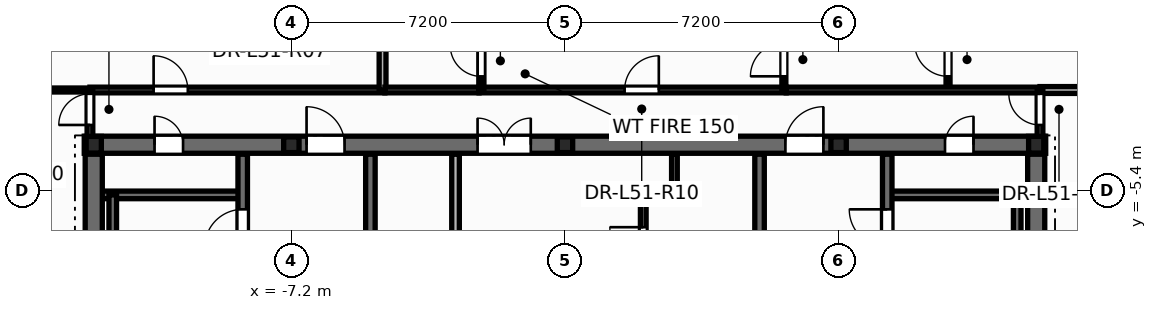
"""IFC4 building model, lengths in metres.
Left out: names, types, materials, properties, quantities, classifications, styles, units other than length and angle.
Written with IfcOpenShell. Run it as: python <this file> out.ifc"""

import sys

from ifc_helpers import new_model, si_unit, direction, frame, frame_2d, origin, origin_2d, place, context, subcontext, project, spatial, rectangle, i_section, extrude, element, fill, save


model = new_model("IFC4")
c1 = context("Model", 3, precision=1e-05, world=origin(), true_north=direction((0.0, 1.0)))
c2 = subcontext(c1, "Body", "Model", "MODEL_VIEW")
j1 = project(units=[si_unit("LENGTHUNIT", "METRE"), si_unit("PLANEANGLEUNIT", "RADIAN")], contexts=[c1])
p1 = place(None, origin())
s1 = spatial("IfcSite", under=j1, at=p1, CompositionType="ELEMENT")
p2 = place(p1, origin())
s2 = spatial("IfcBuilding", under=s1, at=p2, CompositionType="ELEMENT")
p3 = place(p2, frame((0.0, 0.0, 196.5)))
s3 = spatial("IfcBuildingStorey", under=s2, at=p3, CompositionType="ELEMENT", Elevation=196.5)
for number, where, z_axis, x_axis in (
    (1, (12.4, -4.2, 0.0), (0.0, 0.0, 1.0), (1.0, 0.0, 0.0)),
    (2, (-12.4, -4.2, 0.0), (0.0, 0.0, 1.0), (1.0, 0.0, 0.0)),
):
    element("IfcColumn", number, at=place(p3, frame(where, z_axis=z_axis, x_axis=x_axis)), inside=s3, PredefinedType="COLUMN", context=c2, shape_type="SweptSolid", body=[
        extrude(i_section(OverallWidth=0.4, OverallDepth=0.44, WebThickness=0.028, FlangeThickness=0.04, at=origin_2d()), origin(), (0.0, 0.0, 1.0), 3.6),
    ])
for number, where, z_axis, x_axis in (
    (3, (-7.2, -4.2, 0.0), (0.0, 0.0, 1.0), (1.0, 0.0, 0.0)),
    (4, (0.0, -4.2, 0.0), (0.0, 0.0, 1.0), (1.0, 0.0, 0.0)),
    (5, (7.2, -4.2, 0.0), (0.0, 0.0, 1.0), (1.0, 0.0, 0.0)),
):
    element("IfcColumn", number, at=place(p3, frame(where, z_axis=z_axis, x_axis=x_axis)), inside=s3, PredefinedType="PILASTER", context=c2, shape_type="SweptSolid", body=[
        extrude(i_section(OverallWidth=0.405, OverallDepth=0.414, WebThickness=0.022, FlangeThickness=0.032, at=origin_2d()), origin(), (0.0, 0.0, 1.0), 3.6),
    ])
p4 = place(p3, frame((2.06, -7.9, 0.0), z_axis=(0.0, 0.0, 1.0), x_axis=(0.0, 1.0, 0.0)))
e6 = element("IfcWall", 6, at=p4, inside=s3, PredefinedType="PARTITIONING", context=c2, shape_type="SweptSolid", body=[
    extrude(rectangle(XDim=2.3, YDim=0.15, at=frame_2d((1.15, 0.0))), origin(), (0.0, 0.0, 1.0), 3.35),
])
p5 = place(p4, frame((0.65, 0.0, 0.0)))
e7 = element("IfcOpeningElement", 7, at=p5, cuts=e6, PredefinedType="OPENING", context=c2, shape_type="SweptSolid", body=[
    extrude(rectangle(XDim=0.886, YDim=2.104, at=frame_2d((0.44, 1.052))), frame((0.0, 0.085, 0.0), z_axis=(0.0, -1.0, 0.0), x_axis=(1.0, 0.0, 0.0)), (0.0, 0.0, 1.0), 0.17),
])
p6 = place(p3, frame((2.06, -5.6, 0.0), z_axis=(0.0, 0.0, 1.0), x_axis=(1.0, 0.0, 0.0)))
e8 = element("IfcWall", 8, at=p6, inside=s3, PredefinedType="PARTITIONING", context=c2, shape_type="SweptSolid", body=[
    extrude(rectangle(XDim=0.82, YDim=0.15, at=frame_2d((0.41, 0.0))), origin(), (0.0, 0.0, 1.0), 3.35),
])
p7 = place(p3, frame((2.88, -5.6, 0.0), z_axis=(0.0, 0.0, 1.0), x_axis=(0.0, 1.0, 0.0)))
e9 = element("IfcWall", 9, at=p7, inside=s3, PredefinedType="PARTITIONING", context=c2, shape_type="SweptSolid", body=[
    extrude(rectangle(XDim=1.15, YDim=0.15, at=frame_2d((0.575, 0.0))), origin(), (0.0, 0.0, 1.0), 3.35),
])
p8 = place(p3, frame((-12.65, -4.2, 0.0), z_axis=(0.0, 0.0, 1.0), x_axis=(1.0, 0.0, 0.0)))
e10 = element("IfcWall", 10, at=p8, inside=s3, PredefinedType="SHEAR", context=c2, shape_type="SweptSolid", body=[
    extrude(rectangle(XDim=25.3, YDim=0.45, at=frame_2d((12.65, 0.0))), origin(), (0.0, 0.0, 1.0), 3.6),
])
p9 = place(p8, frame((1.85, 0.0, 0.0)))
e11 = element("IfcOpeningElement", 11, at=p9, cuts=e10, PredefinedType="OPENING", context=c2, shape_type="SweptSolid", body=[
    extrude(rectangle(XDim=0.756, YDim=2.054, at=frame_2d((0.375, 1.027))), frame((0.0, 0.235, 0.0), z_axis=(0.0, -1.0, 0.0), x_axis=(1.0, 0.0, 0.0)), (0.0, 0.0, 1.0), 0.47),
])
p10 = place(p8, frame((22.65, 0.0, 0.0)))
e12 = element("IfcOpeningElement", 12, at=p10, cuts=e10, PredefinedType="OPENING", context=c2, shape_type="SweptSolid", body=[
    extrude(rectangle(XDim=0.756, YDim=2.054, at=frame_2d((0.375, 1.027))), frame((0.0, 0.235, 0.0), z_axis=(0.0, -1.0, 0.0), x_axis=(1.0, 0.0, 0.0)), (0.0, 0.0, 1.0), 0.47),
])
p11 = place(p8, frame((5.85, 0.0, 0.0)))
e13 = element("IfcOpeningElement", 13, at=p11, cuts=e10, PredefinedType="OPENING", context=c2, shape_type="SweptSolid", body=[
    extrude(rectangle(XDim=1.006, YDim=2.104, at=frame_2d((0.5, 1.052))), frame((0.0, 0.235, 0.0), z_axis=(0.0, -1.0, 0.0), x_axis=(1.0, 0.0, 0.0)), (0.0, 0.0, 1.0), 0.47),
])
p12 = place(p8, frame((10.35, 0.0, 0.0)))
e14 = element("IfcOpeningElement", 14, at=p12, cuts=e10, PredefinedType="OPENING", context=c2, shape_type="SweptSolid", body=[
    extrude(rectangle(XDim=1.406, YDim=2.154, at=frame_2d((0.7, 1.077))), frame((0.0, 0.235, 0.0), z_axis=(0.0, -1.0, 0.0), x_axis=(1.0, 0.0, 0.0)), (0.0, 0.0, 1.0), 0.47),
])
p13 = place(p8, frame((18.45, 0.0, 0.0)))
e15 = element("IfcOpeningElement", 15, at=p13, cuts=e10, PredefinedType="OPENING", context=c2, shape_type="SweptSolid", body=[
    extrude(rectangle(XDim=1.006, YDim=2.104, at=frame_2d((0.5, 1.052))), frame((0.0, 0.235, 0.0), z_axis=(0.0, -1.0, 0.0), x_axis=(1.0, 0.0, 0.0)), (0.0, 0.0, 1.0), 0.47),
])
p14 = place(p3, frame((-12.35, -5.52, 0.0), z_axis=(0.0, 0.0, 1.0), x_axis=(1.0, 0.0, 0.0)))
e16 = element("IfcWall", 16, at=p14, inside=s3, PredefinedType="SOLIDWALL", context=c2, shape_type="SweptSolid", body=[
    extrude(rectangle(XDim=3.87, YDim=0.2, at=frame_2d((1.935, 0.0))), origin(), (0.0, 0.0, 1.0), 3.6),
])
p15 = place(p3, frame((-11.9, -13.1, 0.0), z_axis=(0.0, 0.0, 1.0), x_axis=(0.0, 1.0, 0.0)))
e17 = element("IfcWall", 17, at=p15, inside=s3, PredefinedType="SOLIDWALL", context=c2, shape_type="SweptSolid", body=[
    extrude(rectangle(XDim=7.58, YDim=0.2, at=frame_2d((3.79, 0.0))), origin(), (0.0, 0.0, 1.0), 3.6),
])
p16 = place(p3, frame((8.48, -5.52, 0.0), z_axis=(0.0, 0.0, 1.0), x_axis=(1.0, 0.0, 0.0)))
e18 = element("IfcWall", 18, at=p16, inside=s3, PredefinedType="SOLIDWALL", context=c2, shape_type="SweptSolid", body=[
    extrude(rectangle(XDim=3.87, YDim=0.2, at=frame_2d((1.935, 0.0))), origin(), (0.0, 0.0, 1.0), 3.6),
])
p17 = place(p3, frame((11.9, -13.1, 0.0), z_axis=(0.0, 0.0, 1.0), x_axis=(0.0, 1.0, 0.0)))
e19 = element("IfcWall", 19, at=p17, inside=s3, PredefinedType="SOLIDWALL", context=c2, shape_type="SweptSolid", body=[
    extrude(rectangle(XDim=7.58, YDim=0.2, at=frame_2d((3.79, 0.0))), origin(), (0.0, 0.0, 1.0), 3.6),
])
p18 = place(p3, frame((-8.48, -13.85, 0.0), z_axis=(0.0, 0.0, 1.0), x_axis=(0.0, 1.0, 0.0)))
e20 = element("IfcWall", 20, at=p18, inside=s3, PredefinedType="SHEAR", context=c2, shape_type="SweptSolid", body=[
    extrude(rectangle(XDim=9.4, YDim=0.25, at=frame_2d((4.7, 0.0))), origin(), (0.0, 0.0, 1.0), 3.6),
])
p19 = place(p18, frame((6.95, 0.0, 0.0)))
e21 = element("IfcOpeningElement", 21, at=p19, cuts=e20, PredefinedType="OPENING", context=c2, shape_type="SweptSolid", body=[
    extrude(rectangle(XDim=1.006, YDim=2.104, at=frame_2d((0.5, 1.052))), frame((0.0, 0.135, 0.0), z_axis=(0.0, -1.0, 0.0), x_axis=(1.0, 0.0, 0.0)), (0.0, 0.0, 1.0), 0.27),
])
p20 = place(p3, frame((8.48, -13.85, 0.0), z_axis=(0.0, 0.0, 1.0), x_axis=(0.0, 1.0, 0.0)))
e22 = element("IfcWall", 22, at=p20, inside=s3, PredefinedType="SHEAR", context=c2, shape_type="SweptSolid", body=[
    extrude(rectangle(XDim=9.4, YDim=0.25, at=frame_2d((4.7, 0.0))), origin(), (0.0, 0.0, 1.0), 3.6),
])
p21 = place(p20, frame((6.95, 0.0, 0.0)))
e23 = element("IfcOpeningElement", 23, at=p21, cuts=e22, PredefinedType="OPENING", context=c2, shape_type="SweptSolid", body=[
    extrude(rectangle(XDim=1.006, YDim=2.104, at=frame_2d((0.5, 1.052))), frame((0.0, 0.135, 0.0), z_axis=(0.0, -1.0, 0.0), x_axis=(1.0, 0.0, 0.0)), (0.0, 0.0, 1.0), 0.27),
])
for number, where, z_axis, x_axis in (
    (24, (-5.12, -13.85, 0.0), (0.0, 0.0, 1.0), (0.0, 1.0, 0.0)),
    (25, (5.12, -13.85, 0.0), (0.0, 0.0, 1.0), (0.0, 1.0, 0.0)),
):
    element("IfcWall", number, at=place(p3, frame(where, z_axis=z_axis, x_axis=x_axis)), inside=s3, PredefinedType="SHEAR", context=c2, shape_type="SweptSolid", body=[
        extrude(rectangle(XDim=9.4, YDim=0.25, at=frame_2d((4.7, 0.0))), origin(), (0.0, 0.0, 1.0), 3.6),
    ])
for number, where, z_axis, x_axis in (
    (26, (-12.4, -13.85, 0.0), (0.0, 0.0, 1.0), (0.0, 1.0, 0.0)),
    (27, (12.4, -13.85, 0.0), (0.0, 0.0, 1.0), (0.0, 1.0, 0.0)),
):
    element("IfcWall", number, at=place(p3, frame(where, z_axis=z_axis, x_axis=x_axis)), inside=s3, PredefinedType="SHEAR", context=c2, shape_type="SweptSolid", body=[
        extrude(rectangle(XDim=9.4, YDim=0.45, at=frame_2d((4.7, 0.0))), origin(), (0.0, 0.0, 1.0), 3.6),
    ])
p22 = place(p3, frame((-2.88, -9.45, 0.0), z_axis=(0.0, 0.0, 1.0), x_axis=(0.0, 1.0, 0.0)))
e28 = element("IfcWall", 28, at=p22, inside=s3, PredefinedType="SOLIDWALL", context=c2, shape_type="SweptSolid", body=[
    extrude(rectangle(XDim=5.0, YDim=0.2, at=frame_2d((2.5, 0.0))), origin(), (0.0, 0.0, 1.0), 3.35),
])
p23 = place(p22, frame((2.05, 0.0, 0.0)))
e29 = element("IfcOpeningElement", 29, at=p23, cuts=e28, PredefinedType="OPENING", context=c2, shape_type="SweptSolid", body=[
    extrude(rectangle(XDim=0.926, YDim=2.104, at=frame_2d((0.46, 1.052))), frame((0.0, 0.11, 0.0), z_axis=(0.0, -1.0, 0.0), x_axis=(1.0, 0.0, 0.0)), (0.0, 0.0, 1.0), 0.22),
])
p24 = place(p3, frame((-2.26, -2.76, 0.0), z_axis=(0.0, 0.0, 1.0), x_axis=(1.0, 0.0, 0.0)))
e30 = element("IfcWall", 30, at=p24, inside=s3, PredefinedType="PARTITIONING", context=c2, shape_type="SweptSolid", body=[
    extrude(rectangle(XDim=8.08, YDim=0.15, at=frame_2d((4.04, 0.0))), origin(), (0.0, 0.0, 1.0), 2.325),
])
p25 = place(p24, frame((3.829, 0.0, 0.0)))
e31 = element("IfcOpeningElement", 31, at=p25, cuts=e30, PredefinedType="OPENING", context=c2, shape_type="SweptSolid", body=[
    extrude(rectangle(XDim=0.906, YDim=2.104, at=frame_2d((0.45, 1.052))), frame((0.0, 0.085, 0.0), z_axis=(0.0, -1.0, 0.0), x_axis=(1.0, 0.0, 0.0)), (0.0, 0.0, 1.0), 0.17),
])
p26 = place(p3, frame((-12.5, -2.76, 0.0), z_axis=(0.0, 0.0, 1.0), x_axis=(1.0, 0.0, 0.0)))
e32 = element("IfcWall", 32, at=p26, inside=s3, PredefinedType="PARTITIONING", context=c2, shape_type="SweptSolid", body=[
    extrude(rectangle(XDim=7.76, YDim=0.15, at=frame_2d((3.88, 0.0))), origin(), (0.0, 0.0, 1.0), 2.325),
])
p27 = place(p26, frame((1.675, 0.0, 0.0)))
e33 = element("IfcOpeningElement", 33, at=p27, cuts=e32, PredefinedType="OPENING", context=c2, shape_type="SweptSolid", body=[
    extrude(rectangle(XDim=0.906, YDim=2.104, at=frame_2d((0.45, 1.052))), frame((0.0, 0.085, 0.0), z_axis=(0.0, -1.0, 0.0), x_axis=(1.0, 0.0, 0.0)), (0.0, 0.0, 1.0), 0.17),
])
p28 = place(p3, frame((10.08, -2.76, 0.0), z_axis=(0.0, 0.0, 1.0), x_axis=(0.0, 1.0, 0.0)))
e34 = element("IfcWall", 34, at=p28, inside=s3, PredefinedType="PARTITIONING", context=c2, shape_type="SweptSolid", body=[
    extrude(rectangle(XDim=6.971, YDim=0.105, at=frame_2d((3.485, 0.0))), origin(), (0.0, 0.0, 1.0), 2.625),
])
p29 = place(p28, frame((0.36, 0.0, 0.0)))
e35 = element("IfcOpeningElement", 35, at=p29, cuts=e34, PredefinedType="OPENING", context=c2, shape_type="SweptSolid", body=[
    extrude(rectangle(XDim=0.886, YDim=2.104, at=frame_2d((0.44, 1.052))), frame((0.0, 0.062, 0.0), z_axis=(0.0, -1.0, 0.0), x_axis=(1.0, 0.0, 0.0)), (0.0, 0.0, 1.0), 0.125),
])
p30 = place(p3, frame((5.76, -2.76, 0.0), z_axis=(0.0, 0.0, 1.0), x_axis=(0.0, 1.0, 0.0)))
e36 = element("IfcWall", 36, at=p30, inside=s3, PredefinedType="PARTITIONING", context=c2, shape_type="SweptSolid", body=[
    extrude(rectangle(XDim=6.52, YDim=0.105, at=frame_2d((3.26, 0.0))), origin(), (0.0, 0.0, 1.0), 2.325),
])
p31 = place(p30, frame((0.36, 0.0, 0.0)))
e37 = element("IfcOpeningElement", 37, at=p31, cuts=e36, PredefinedType="OPENING", context=c2, shape_type="SweptSolid", body=[
    extrude(rectangle(XDim=0.886, YDim=2.104, at=frame_2d((0.44, 1.052))), frame((0.0, 0.062, 0.0), z_axis=(0.0, -1.0, 0.0), x_axis=(1.0, 0.0, 0.0)), (0.0, 0.0, 1.0), 0.125),
])
p32 = place(p3, frame((-4.8, -2.76, 0.0), z_axis=(0.0, 0.0, 1.0), x_axis=(0.0, 1.0, 0.0)))
e38 = element("IfcWall", 38, at=p32, inside=s3, PredefinedType="PARTITIONING", context=c2, shape_type="SweptSolid", body=[
    extrude(rectangle(XDim=14.31, YDim=0.18, at=frame_2d((7.155, 0.0))), origin(), (0.0, 0.0, 1.0), 2.325),
])
p33 = place(p3, frame((5.822, -2.76, 0.0), z_axis=(0.0, 0.0, 1.0), x_axis=(1.0, 0.0, 0.0)))
e39 = element("IfcWall", 39, at=p33, inside=s3, PredefinedType="PARTITIONING", context=c2, shape_type="SweptSolid", body=[
    extrude(rectangle(XDim=6.678, YDim=0.15, at=frame_2d((3.339, 0.0))), origin(), (0.0, 0.0, 1.0), 2.325),
])
p34 = place(p3, frame((-2.2, -2.76, 0.0), z_axis=(0.0, 0.0, 1.0), x_axis=(0.0, 1.0, 0.0)))
e40 = element("IfcWall", 40, at=p34, inside=s3, PredefinedType="PARTITIONING", context=c2, shape_type="SweptSolid", body=[
    extrude(rectangle(XDim=2.92, YDim=0.135, at=frame_2d((1.46, 0.0))), origin(), (0.0, 0.0, 1.0), 3.35),
])
p35 = place(p34, frame((0.357, 0.0, 0.0)))
e41 = element("IfcOpeningElement", 41, at=p35, cuts=e40, PredefinedType="OPENING", context=c2, shape_type="SweptSolid", body=[
    extrude(rectangle(XDim=0.826, YDim=2.104, at=frame_2d((0.41, 1.052))), frame((0.0, 0.078, 0.0), z_axis=(0.0, -1.0, 0.0), x_axis=(1.0, 0.0, 0.0)), (0.0, 0.0, 1.0), 0.155),
])
p36 = place(p3, frame((-4.738, -2.76, 0.0), z_axis=(0.0, 0.0, 1.0), x_axis=(1.0, 0.0, 0.0)))
e42 = element("IfcWall", 42, at=p36, inside=s3, PredefinedType="PARTITIONING", context=c2, shape_type="SweptSolid", body=[
    extrude(rectangle(XDim=2.476, YDim=0.15, at=frame_2d((1.238, 0.0))), origin(), (0.0, 0.0, 1.0), 2.969),
])
p37 = place(p3, frame((-15.095, -2.76, 0.0), z_axis=(0.0, 0.0, 1.0), x_axis=(1.0, 0.0, 0.0)))
e43 = element("IfcWall", 43, at=p37, inside=s3, PredefinedType="PARTITIONING", context=c2, shape_type="SweptSolid", body=[
    extrude(rectangle(XDim=2.595, YDim=0.105, at=frame_2d((1.297, 0.0))), origin(), (0.0, 0.0, 1.0), 2.625),
])
p38 = place(p3, frame((12.5, -2.76, 0.0), z_axis=(0.0, 0.0, 1.0), x_axis=(1.0, 0.0, 0.0)))
e44 = element("IfcWall", 44, at=p38, inside=s3, PredefinedType="PARTITIONING", context=c2, shape_type="SweptSolid", body=[
    extrude(rectangle(XDim=2.595, YDim=0.18, at=frame_2d((1.297, 0.0))), origin(), (0.0, 0.0, 1.0), 2.625),
])
p39 = place(p3, frame((-12.5, -4.24, 0.0), z_axis=(0.0, 0.0, 1.0), x_axis=(0.0, 1.0, 0.0)))
e45 = element("IfcWall", 45, at=p39, inside=s3, PredefinedType="PARTITIONING", context=c2, shape_type="SweptSolid", body=[
    extrude(rectangle(XDim=1.48, YDim=0.15, at=frame_2d((0.74, 0.0))), origin(), (0.0, 0.0, 1.0), 2.325),
])
p40 = place(p39, frame((0.56, 0.0, 0.0)))
e46 = element("IfcOpeningElement", 46, at=p40, cuts=e45, PredefinedType="OPENING", context=c2, shape_type="SweptSolid", body=[
    extrude(rectangle(XDim=0.826, YDim=2.104, at=frame_2d((0.41, 1.052))), frame((0.0, 0.085, 0.0), z_axis=(0.0, -1.0, 0.0), x_axis=(1.0, 0.0, 0.0)), (0.0, 0.0, 1.0), 0.17),
])
p41 = place(p3, frame((12.5, -4.24, 0.0), z_axis=(0.0, 0.0, 1.0), x_axis=(0.0, 1.0, 0.0)))
e47 = element("IfcWall", 47, at=p41, inside=s3, PredefinedType="PARTITIONING", context=c2, shape_type="SweptSolid", body=[
    extrude(rectangle(XDim=1.48, YDim=0.15, at=frame_2d((0.74, 0.0))), origin(), (0.0, 0.0, 1.0), 2.325),
])
p42 = place(p41, frame((0.56, 0.0, 0.0)))
e48 = element("IfcOpeningElement", 48, at=p42, cuts=e47, PredefinedType="OPENING", context=c2, shape_type="SweptSolid", body=[
    extrude(rectangle(XDim=0.826, YDim=2.104, at=frame_2d((0.41, 1.052))), frame((0.0, 0.085, 0.0), z_axis=(0.0, -1.0, 0.0), x_axis=(1.0, 0.0, 0.0)), (0.0, 0.0, 1.0), 0.17),
])
p43 = place(p5, origin())
e49 = element("IfcDoor", 49, at=p43, inside=s3, OperationType="SINGLE_SWING_RIGHT", PredefinedType="DOOR", context=c2, shape_type="SweptSolid", body=[
    extrude(rectangle(XDim=0.88, YDim=2.1, at=frame_2d((0.44, 1.05))), frame((0.0, 0.025, 0.0), z_axis=(0.0, -1.0, 0.0), x_axis=(1.0, 0.0, 0.0)), (0.0, 0.0, 1.0), 0.05),
])
fill(e7, e49)
p44 = place(p19, origin())
e50 = element("IfcDoor", 50, at=p44, inside=s3, OperationType="SINGLE_SWING_LEFT", PredefinedType="DOOR", context=c2, shape_type="SweptSolid", body=[
    extrude(rectangle(XDim=1.0, YDim=2.1, at=frame_2d((0.5, 1.05))), frame((0.0, 0.025, 0.0), z_axis=(0.0, -1.0, 0.0), x_axis=(1.0, 0.0, 0.0)), (0.0, 0.0, 1.0), 0.05),
])
fill(e21, e50)
p45 = place(p21, origin())
e51 = element("IfcDoor", 51, at=p45, inside=s3, OperationType="SINGLE_SWING_RIGHT", PredefinedType="DOOR", context=c2, shape_type="SweptSolid", body=[
    extrude(rectangle(XDim=1.0, YDim=2.1, at=frame_2d((0.5, 1.05))), frame((0.0, 0.025, 0.0), z_axis=(0.0, -1.0, 0.0), x_axis=(1.0, 0.0, 0.0)), (0.0, 0.0, 1.0), 0.05),
])
fill(e23, e51)
p46 = place(p9, origin())
e52 = element("IfcDoor", 52, at=p46, inside=s3, OperationType="SINGLE_SWING_LEFT", PredefinedType="DOOR", context=c2, shape_type="SweptSolid", body=[
    extrude(rectangle(XDim=0.75, YDim=2.05, at=frame_2d((0.375, 1.025))), frame((0.0, 0.025, 0.0), z_axis=(0.0, -1.0, 0.0), x_axis=(1.0, 0.0, 0.0)), (0.0, 0.0, 1.0), 0.05),
])
fill(e11, e52)
p47 = place(p10, origin())
e53 = element("IfcDoor", 53, at=p47, inside=s3, OperationType="SINGLE_SWING_RIGHT", PredefinedType="DOOR", context=c2, shape_type="SweptSolid", body=[
    extrude(rectangle(XDim=0.75, YDim=2.05, at=frame_2d((0.375, 1.025))), frame((0.0, 0.025, 0.0), z_axis=(0.0, -1.0, 0.0), x_axis=(1.0, 0.0, 0.0)), (0.0, 0.0, 1.0), 0.05),
])
fill(e12, e53)
p48 = place(p11, origin())
e54 = element("IfcDoor", 54, at=p48, inside=s3, OperationType="SINGLE_SWING_LEFT", PredefinedType="DOOR", context=c2, shape_type="SweptSolid", body=[
    extrude(rectangle(XDim=1.0, YDim=2.1, at=frame_2d((0.5, 1.05))), frame((0.0, 0.025, 0.0), z_axis=(0.0, -1.0, 0.0), x_axis=(1.0, 0.0, 0.0)), (0.0, 0.0, 1.0), 0.05),
])
fill(e13, e54)
p49 = place(p12, origin())
e55 = element("IfcDoor", 55, at=p49, inside=s3, OperationType="DOUBLE_DOOR_SINGLE_SWING", PredefinedType="DOOR", context=c2, shape_type="SweptSolid", body=[
    extrude(rectangle(XDim=1.4, YDim=2.15, at=frame_2d((0.7, 1.075))), frame((0.0, 0.025, 0.0), z_axis=(0.0, -1.0, 0.0), x_axis=(1.0, 0.0, 0.0)), (0.0, 0.0, 1.0), 0.05),
])
fill(e14, e55)
p50 = place(p13, origin())
e56 = element("IfcDoor", 56, at=p50, inside=s3, OperationType="SINGLE_SWING_RIGHT", PredefinedType="DOOR", context=c2, shape_type="SweptSolid", body=[
    extrude(rectangle(XDim=1.0, YDim=2.1, at=frame_2d((0.5, 1.05))), frame((0.0, 0.025, 0.0), z_axis=(0.0, -1.0, 0.0), x_axis=(1.0, 0.0, 0.0)), (0.0, 0.0, 1.0), 0.05),
])
fill(e15, e56)
p51 = place(p40, origin())
e57 = element("IfcDoor", 57, at=p51, inside=s3, OperationType="SINGLE_SWING_LEFT", PredefinedType="DOOR", context=c2, shape_type="SweptSolid", body=[
    extrude(rectangle(XDim=0.82, YDim=2.1, at=frame_2d((0.41, 1.05))), frame((0.0, 0.025, 0.0), z_axis=(0.0, -1.0, 0.0), x_axis=(1.0, 0.0, 0.0)), (0.0, 0.0, 1.0), 0.05),
])
fill(e46, e57)
p52 = place(p42, origin())
e58 = element("IfcDoor", 58, at=p52, inside=s3, OperationType="SINGLE_SWING_RIGHT", PredefinedType="DOOR", context=c2, shape_type="SweptSolid", body=[
    extrude(rectangle(XDim=0.82, YDim=2.1, at=frame_2d((0.41, 1.05))), frame((0.0, 0.025, 0.0), z_axis=(0.0, -1.0, 0.0), x_axis=(1.0, 0.0, 0.0)), (0.0, 0.0, 1.0), 0.05),
])
fill(e48, e58)
p53 = place(p27, origin())
e59 = element("IfcDoor", 59, at=p53, inside=s3, OperationType="SINGLE_SWING_LEFT", PredefinedType="DOOR", context=c2, shape_type="SweptSolid", body=[
    extrude(rectangle(XDim=0.9, YDim=2.1, at=frame_2d((0.45, 1.05))), frame((0.0, 0.025, 0.0), z_axis=(0.0, -1.0, 0.0), x_axis=(1.0, 0.0, 0.0)), (0.0, 0.0, 1.0), 0.05),
])
fill(e33, e59)
p54 = place(p35, origin())
e60 = element("IfcDoor", 60, at=p54, inside=s3, OperationType="SINGLE_SWING_RIGHT", PredefinedType="DOOR", context=c2, shape_type="SweptSolid", body=[
    extrude(rectangle(XDim=0.82, YDim=2.1, at=frame_2d((0.41, 1.05))), frame((0.0, 0.025, 0.0), z_axis=(0.0, -1.0, 0.0), x_axis=(1.0, 0.0, 0.0)), (0.0, 0.0, 1.0), 0.05),
])
fill(e41, e60)
p55 = place(p25, origin())
e61 = element("IfcDoor", 61, at=p55, inside=s3, OperationType="SINGLE_SWING_RIGHT", PredefinedType="DOOR", context=c2, shape_type="SweptSolid", body=[
    extrude(rectangle(XDim=0.9, YDim=2.1, at=frame_2d((0.45, 1.05))), frame((0.0, 0.025, 0.0), z_axis=(0.0, -1.0, 0.0), x_axis=(1.0, 0.0, 0.0)), (0.0, 0.0, 1.0), 0.05),
])
fill(e31, e61)
p56 = place(p31, origin())
e62 = element("IfcDoor", 62, at=p56, inside=s3, OperationType="SINGLE_SWING_LEFT", PredefinedType="DOOR", context=c2, shape_type="SweptSolid", body=[
    extrude(rectangle(XDim=0.88, YDim=2.1, at=frame_2d((0.44, 1.05))), frame((0.0, 0.025, 0.0), z_axis=(0.0, -1.0, 0.0), x_axis=(1.0, 0.0, 0.0)), (0.0, 0.0, 1.0), 0.05),
])
fill(e37, e62)
p57 = place(p29, origin())
e63 = element("IfcDoor", 63, at=p57, inside=s3, OperationType="SINGLE_SWING_RIGHT", PredefinedType="DOOR", context=c2, shape_type="SweptSolid", body=[
    extrude(rectangle(XDim=0.88, YDim=2.1, at=frame_2d((0.44, 1.05))), frame((0.0, 0.025, 0.0), z_axis=(0.0, -1.0, 0.0), x_axis=(1.0, 0.0, 0.0)), (0.0, 0.0, 1.0), 0.05),
])
fill(e35, e63)
save(model, sys.argv[1])
